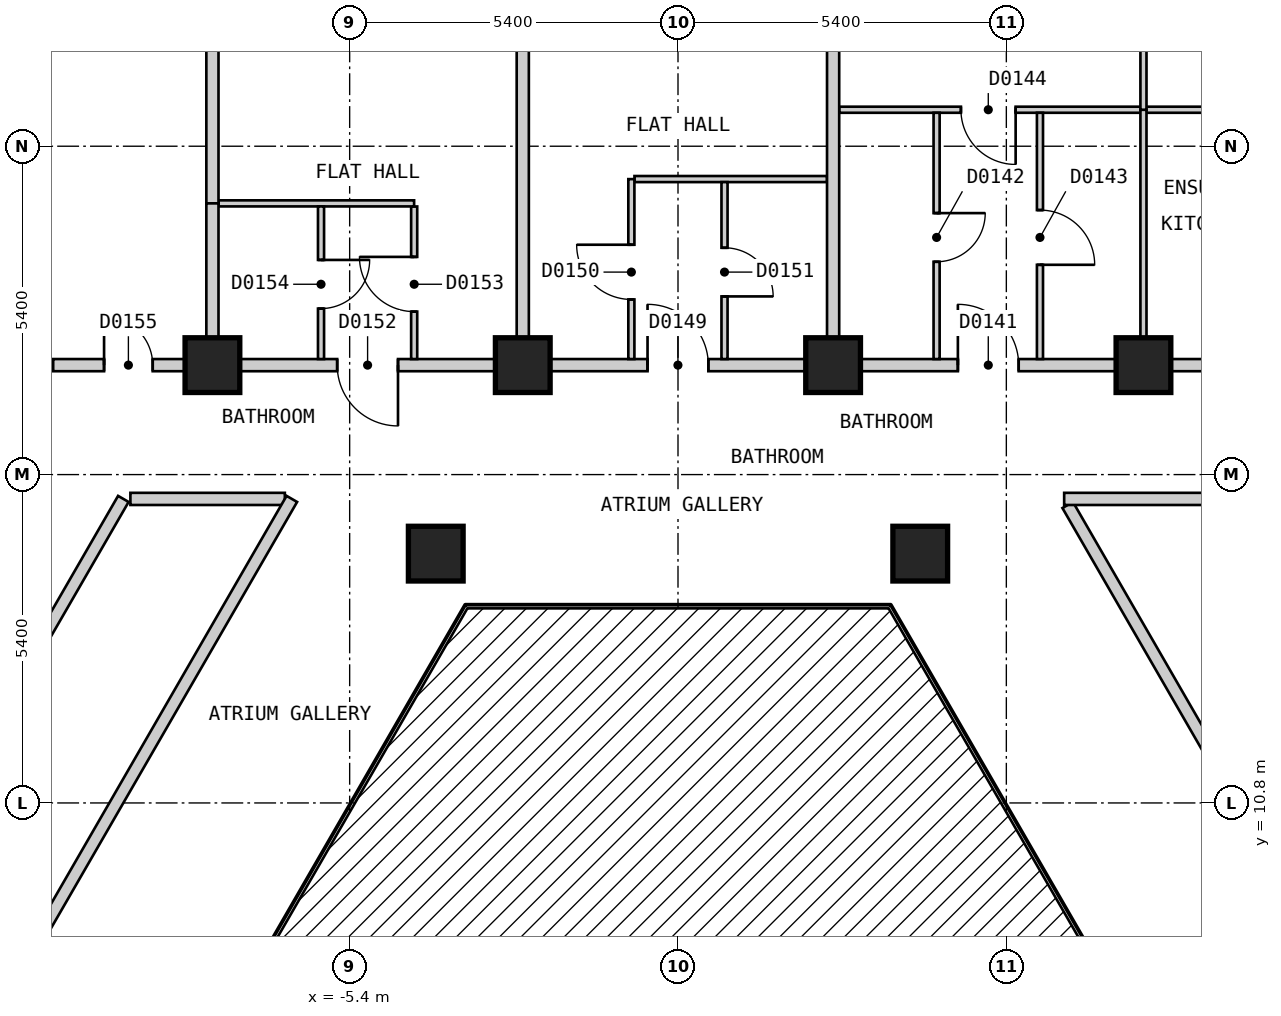
"""IFC4 building model, lengths in metres.
Left out: names, types, materials, properties, quantities, classifications, styles, units other than length and angle.
Written with IfcOpenShell. Run it as: python <this file> out.ifc"""

import sys

from ifc_helpers import new_model, si_unit, direction, frame, frame_2d, origin, origin_2d, place, context, subcontext, project, spatial, rectangle, extrude, element, fill, save


model = new_model("IFC4")
c1 = context("Model", 3, precision=1e-05, world=origin(), true_north=direction((0.0, 1.0)))
c2 = subcontext(c1, "Body", "Model", "MODEL_VIEW")
j1 = project(units=[si_unit("LENGTHUNIT", "METRE"), si_unit("PLANEANGLEUNIT", "RADIAN")], contexts=[c1])
p1 = place(None, origin())
s1 = spatial("IfcSite", under=j1, at=p1, CompositionType="ELEMENT")
p2 = place(p1, origin())
s2 = spatial("IfcBuilding", under=s1, at=p2, CompositionType="ELEMENT")
p3 = place(p2, frame((0.0, 0.0, 29.4)))
s3 = spatial("IfcBuildingStorey", under=s2, at=p3, CompositionType="ELEMENT", Elevation=29.4)
for number, where, z_axis, x_axis in (
    (1, (7.655, 18.0, 0.0), (0.0, 0.0, 1.0), (-1.0, 0.0, 0.0)),
    (2, (3.984, 14.9, 0.0), (0.0, 0.0, 1.0), (1.0, 0.0, 0.0)),
    (3, (2.551, 18.0, 0.0), (0.0, 0.0, 1.0), (-1.0, 0.0, 0.0)),
    (4, (-2.553, 18.0, 0.0), (0.0, 0.0, 1.0), (-1.0, 0.0, 0.0)),
    (5, (-3.984, 14.9, 0.0), (0.0, 0.0, 1.0), (1.0, 0.0, 0.0)),
    (6, (-7.657, 18.0, 0.0), (0.0, 0.0, 1.0), (-1.0, 0.0, 0.0)),
):
    element("IfcColumn", number, at=place(p3, frame(where, z_axis=z_axis, x_axis=x_axis)), inside=s3, PredefinedType="COLUMN", context=c2, shape_type="SweptSolid", body=[
        extrude(rectangle(XDim=0.9, YDim=0.9, at=origin_2d()), origin(), (0.0, 0.0, 1.0), 3.0),
    ])
p4 = place(p3, frame((6.409, 15.7, 0.0), z_axis=(0.0, 0.0, 1.0), x_axis=(0.499930377127, -0.866065596838, 0.0)))
e7 = element("IfcWall", 7, at=p4, inside=s3, PredefinedType="PARTITIONING", context=c2, shape_type="SweptSolid", body=[
    extrude(rectangle(XDim=8.775, YDim=0.2, at=frame_2d((4.388, 0.0))), origin(), (0.0, 0.0, 1.0), 2.7),
])
p5 = place(p3, frame((-9.006, 15.8, 0.0), z_axis=(0.0, 0.0, 1.0), x_axis=(1.0, 0.0, 0.0)))
e8 = element("IfcWall", 8, at=p5, inside=s3, PredefinedType="PARTITIONING", context=c2, shape_type="SweptSolid", body=[
    extrude(rectangle(XDim=2.54, YDim=0.2, at=frame_2d((1.27, 0.0))), origin(), (0.0, 0.0, 1.0), 2.7),
])
p6 = place(p3, frame((6.351, 15.8, 0.0), z_axis=(0.0, 0.0, 1.0), x_axis=(1.0, 0.0, 0.0)))
e9 = element("IfcWall", 9, at=p6, inside=s3, PredefinedType="PARTITIONING", context=c2, shape_type="SweptSolid", body=[
    extrude(rectangle(XDim=2.771, YDim=0.2, at=frame_2d((1.385, 0.0))), origin(), (0.0, 0.0, 1.0), 2.7),
])
p7 = place(p3, frame((-10.276, 18.0, 0.0), z_axis=(0.0, 0.0, 1.0), x_axis=(1.0, 0.0, 0.0)))
e10 = element("IfcWall", 10, at=p7, inside=s3, PredefinedType="PARTITIONING", context=c2, shape_type="SweptSolid", body=[
    extrude(rectangle(XDim=20.61, YDim=0.2, at=frame_2d((10.305, 0.0))), origin(), (0.0, 0.0, 1.0), 2.7),
])
p8 = place(p7, frame((14.879, 0.0, 0.0)))
e11 = element("IfcOpeningElement", 11, at=p8, cuts=e10, PredefinedType="OPENING", context=c2, shape_type="SweptSolid", body=[
    extrude(rectangle(XDim=1.0, YDim=2.1, at=frame_2d((0.5, 1.05))), frame((0.0, 0.11, 0.0), z_axis=(0.0, -1.0, 0.0), x_axis=(1.0, 0.0, 0.0)), (0.0, 0.0, 1.0), 0.22),
])
p9 = place(p7, frame((9.775, 0.0, 0.0)))
e12 = element("IfcOpeningElement", 12, at=p9, cuts=e10, PredefinedType="OPENING", context=c2, shape_type="SweptSolid", body=[
    extrude(rectangle(XDim=1.0, YDim=2.1, at=frame_2d((0.5, 1.05))), frame((0.0, 0.11, 0.0), z_axis=(0.0, -1.0, 0.0), x_axis=(1.0, 0.0, 0.0)), (0.0, 0.0, 1.0), 0.22),
])
p10 = place(p7, frame((4.671, 0.0, 0.0)))
e13 = element("IfcOpeningElement", 13, at=p10, cuts=e10, PredefinedType="OPENING", context=c2, shape_type="SweptSolid", body=[
    extrude(rectangle(XDim=1.0, YDim=2.1, at=frame_2d((0.5, 1.05))), frame((0.0, 0.11, 0.0), z_axis=(0.0, -1.0, 0.0), x_axis=(1.0, 0.0, 0.0)), (0.0, 0.0, 1.0), 0.22),
])
p11 = place(p7, frame((0.837, 0.0, 0.0)))
e14 = element("IfcOpeningElement", 14, at=p11, cuts=e10, PredefinedType="OPENING", context=c2, shape_type="SweptSolid", body=[
    extrude(rectangle(XDim=0.8, YDim=2.1, at=frame_2d((0.4, 1.05))), frame((0.0, 0.11, 0.0), z_axis=(0.0, -1.0, 0.0), x_axis=(1.0, 0.0, 0.0)), (0.0, 0.0, 1.0), 0.22),
])
p12 = place(p3, frame((-10.854, 8.0, 0.0), z_axis=(0.0, 0.0, 1.0), x_axis=(0.499964141897, 0.86604610548, 0.0)))
e15 = element("IfcWall", 15, at=p12, inside=s3, PredefinedType="PARTITIONING", context=c2, shape_type="SweptSolid", body=[
    extrude(rectangle(XDim=9.007, YDim=0.2, at=frame_2d((4.503, 0.0))), origin(), (0.0, 0.0, 1.0), 2.7),
])
p13 = place(p3, frame((-18.244, -0.001, 0.0), z_axis=(0.0, 0.0, 1.0), x_axis=(0.499962999376, 0.866046765051, 0.0)))
e16 = element("IfcWall", 16, at=p13, inside=s3, PredefinedType="PARTITIONING", context=c2, shape_type="SweptSolid", body=[
    extrude(rectangle(XDim=18.245, YDim=0.2, at=frame_2d((9.123, 0.0))), origin(), (0.0, 0.0, 1.0), 2.7),
])
p14 = place(p13, frame((8.672, 0.0, 0.0)))
e17 = element("IfcOpeningElement", 17, at=p14, cuts=e16, PredefinedType="OPENING", context=c2, shape_type="SweptSolid", body=[
    extrude(rectangle(XDim=0.9, YDim=2.1, at=frame_2d((0.45, 1.05))), frame((0.0, 0.11, 0.0), z_axis=(0.0, -1.0, 0.0), x_axis=(1.0, 0.0, 0.0)), (0.0, 0.0, 1.0), 0.22),
])
p15 = place(p3, frame((-4.339, 20.609, 0.0), z_axis=(0.0, 0.0, 1.0), x_axis=(0.0, -1.0, 0.0)))
e18 = element("IfcWall", 18, at=p15, inside=s3, PredefinedType="PARTITIONING", context=c2, shape_type="SweptSolid", body=[
    extrude(rectangle(XDim=2.509, YDim=0.1, at=frame_2d((1.254, 0.0))), origin(), (0.0, 0.0, 1.0), 2.7),
])
p16 = place(p15, frame((0.829, 0.0, 0.0)))
e19 = element("IfcOpeningElement", 19, at=p16, cuts=e18, PredefinedType="OPENING", context=c2, shape_type="SweptSolid", body=[
    extrude(rectangle(XDim=0.9, YDim=2.1, at=frame_2d((0.45, 1.05))), frame((0.0, 0.06, 0.0), z_axis=(0.0, -1.0, 0.0), x_axis=(1.0, 0.0, 0.0)), (0.0, 0.0, 1.0), 0.12),
])
p17 = place(p3, frame((-7.557, 20.66, 0.0), z_axis=(0.0, 0.0, 1.0), x_axis=(1.0, 0.0, 0.0)))
e20 = element("IfcWall", 20, at=p17, inside=s3, PredefinedType="PARTITIONING", context=c2, shape_type="SweptSolid", body=[
    extrude(rectangle(XDim=3.217, YDim=0.1, at=frame_2d((1.608, 0.0))), origin(), (0.0, 0.0, 1.0), 2.7),
])
p18 = place(p3, frame((-0.716, 21.06, 0.0), z_axis=(0.0, 0.0, 1.0), x_axis=(1.0, 0.0, 0.0)))
e21 = element("IfcWall", 21, at=p18, inside=s3, PredefinedType="PARTITIONING", context=c2, shape_type="SweptSolid", body=[
    extrude(rectangle(XDim=3.167, YDim=0.1, at=frame_2d((1.583, 0.0))), origin(), (0.0, 0.0, 1.0), 2.7),
])
p19 = place(p3, frame((2.651, 22.2, 0.0), z_axis=(0.0, 0.0, 1.0), x_axis=(1.0, 0.0, 0.0)))
e22 = element("IfcWall", 22, at=p19, inside=s3, PredefinedType="PARTITIONING", context=c2, shape_type="SweptSolid", body=[
    extrude(rectangle(XDim=10.109, YDim=0.1, at=frame_2d((5.055, 0.0))), origin(), (0.0, 0.0, 1.0), 2.7),
])
p20 = place(p19, frame((2.002, 0.0, 0.0)))
e23 = element("IfcOpeningElement", 23, at=p20, cuts=e22, PredefinedType="OPENING", context=c2, shape_type="SweptSolid", body=[
    extrude(rectangle(XDim=0.9, YDim=2.1, at=frame_2d((0.45, 1.05))), frame((0.0, 0.06, 0.0), z_axis=(0.0, -1.0, 0.0), x_axis=(1.0, 0.0, 0.0)), (0.0, 0.0, 1.0), 0.12),
])
p21 = place(p19, frame((7.185, 0.0, 0.0)))
e24 = element("IfcOpeningElement", 24, at=p21, cuts=e22, PredefinedType="OPENING", context=c2, shape_type="SweptSolid", body=[
    extrude(rectangle(XDim=0.8, YDim=2.1, at=frame_2d((0.4, 1.05))), frame((0.0, 0.06, 0.0), z_axis=(0.0, -1.0, 0.0), x_axis=(1.0, 0.0, 0.0)), (0.0, 0.0, 1.0), 0.12),
])
p22 = place(p3, frame((4.253, 18.1, 0.0), z_axis=(0.0, 0.0, 1.0), x_axis=(0.0, 1.0, 0.0)))
e25 = element("IfcWall", 25, at=p22, inside=s3, PredefinedType="PARTITIONING", context=c2, shape_type="SweptSolid", body=[
    extrude(rectangle(XDim=4.05, YDim=0.1, at=frame_2d((2.025, 0.0))), origin(), (0.0, 0.0, 1.0), 2.7),
])
p23 = place(p22, frame((1.6, 0.0, 0.0)))
e26 = element("IfcOpeningElement", 26, at=p23, cuts=e25, PredefinedType="OPENING", context=c2, shape_type="SweptSolid", body=[
    extrude(rectangle(XDim=0.8, YDim=2.1, at=frame_2d((0.4, 1.05))), frame((0.0, 0.06, 0.0), z_axis=(0.0, -1.0, 0.0), x_axis=(1.0, 0.0, 0.0)), (0.0, 0.0, 1.0), 0.12),
])
p24 = place(p3, frame((5.953, 18.1, 0.0), z_axis=(0.0, 0.0, 1.0), x_axis=(0.0, 1.0, 0.0)))
e27 = element("IfcWall", 27, at=p24, inside=s3, PredefinedType="PARTITIONING", context=c2, shape_type="SweptSolid", body=[
    extrude(rectangle(XDim=4.05, YDim=0.1, at=frame_2d((2.025, 0.0))), origin(), (0.0, 0.0, 1.0), 2.7),
])
p25 = place(p24, frame((1.55, 0.0, 0.0)))
e28 = element("IfcOpeningElement", 28, at=p25, cuts=e27, PredefinedType="OPENING", context=c2, shape_type="SweptSolid", body=[
    extrude(rectangle(XDim=0.9, YDim=2.1, at=frame_2d((0.45, 1.05))), frame((0.0, 0.06, 0.0), z_axis=(0.0, -1.0, 0.0), x_axis=(1.0, 0.0, 0.0)), (0.0, 0.0, 1.0), 0.12),
])
p26 = place(p3, frame((0.765, 18.1, 0.0), z_axis=(0.0, 0.0, 1.0), x_axis=(0.0, 1.0, 0.0)))
e29 = element("IfcWall", 29, at=p26, inside=s3, PredefinedType="PARTITIONING", context=c2, shape_type="SweptSolid", body=[
    extrude(rectangle(XDim=2.91, YDim=0.1, at=frame_2d((1.455, 0.0))), origin(), (0.0, 0.0, 1.0), 2.7),
])
p27 = place(p26, frame((1.03, 0.0, 0.0)))
e30 = element("IfcOpeningElement", 30, at=p27, cuts=e29, PredefinedType="OPENING", context=c2, shape_type="SweptSolid", body=[
    extrude(rectangle(XDim=0.8, YDim=2.1, at=frame_2d((0.4, 1.05))), frame((0.0, 0.06, 0.0), z_axis=(0.0, -1.0, 0.0), x_axis=(1.0, 0.0, 0.0)), (0.0, 0.0, 1.0), 0.12),
])
p28 = place(p3, frame((7.655, 18.1, 0.0), z_axis=(0.0, 0.0, 1.0), x_axis=(0.0, 1.0, 0.0)))
e31 = element("IfcWall", 31, at=p28, inside=s3, PredefinedType="PARTITIONING", context=c2, shape_type="SweptSolid", body=[
    extrude(rectangle(XDim=4.1, YDim=0.1, at=frame_2d((2.05, 0.0))), origin(), (0.0, 0.0, 1.0), 2.7),
])
p29 = place(p3, frame((-5.871, 18.1, 0.0), z_axis=(0.0, 0.0, 1.0), x_axis=(0.0, 1.0, 0.0)))
e32 = element("IfcWall", 32, at=p29, inside=s3, PredefinedType="PARTITIONING", context=c2, shape_type="SweptSolid", body=[
    extrude(rectangle(XDim=2.51, YDim=0.1, at=frame_2d((1.255, 0.0))), origin(), (0.0, 0.0, 1.0), 2.7),
])
p30 = place(p29, frame((0.83, 0.0, 0.0)))
e33 = element("IfcOpeningElement", 33, at=p30, cuts=e32, PredefinedType="OPENING", context=c2, shape_type="SweptSolid", body=[
    extrude(rectangle(XDim=0.8, YDim=2.1, at=frame_2d((0.4, 1.05))), frame((0.0, 0.06, 0.0), z_axis=(0.0, -1.0, 0.0), x_axis=(1.0, 0.0, 0.0)), (0.0, 0.0, 1.0), 0.12),
])
p31 = place(p3, frame((-0.767, 18.1, 0.0), z_axis=(0.0, 0.0, 1.0), x_axis=(0.0, 1.0, 0.0)))
e34 = element("IfcWall", 34, at=p31, inside=s3, PredefinedType="PARTITIONING", context=c2, shape_type="SweptSolid", body=[
    extrude(rectangle(XDim=2.959, YDim=0.1, at=frame_2d((1.479, 0.0))), origin(), (0.0, 0.0, 1.0), 2.7),
])
p32 = place(p31, frame((0.98, 0.0, 0.0)))
e35 = element("IfcOpeningElement", 35, at=p32, cuts=e34, PredefinedType="OPENING", context=c2, shape_type="SweptSolid", body=[
    extrude(rectangle(XDim=0.9, YDim=2.1, at=frame_2d((0.45, 1.05))), frame((0.0, 0.06, 0.0), z_axis=(0.0, -1.0, 0.0), x_axis=(1.0, 0.0, 0.0)), (0.0, 0.0, 1.0), 0.12),
])
p33 = place(p3, frame((-7.657, 28.1, 0.0), z_axis=(0.0, 0.0, 1.0), x_axis=(0.0, -1.0, 0.0)))
e36 = element("IfcWall", 36, at=p33, inside=s3, PredefinedType="PARTITIONING", context=c2, shape_type="SweptSolid", body=[
    extrude(rectangle(XDim=7.44, YDim=0.2, at=frame_2d((3.72, 0.0))), origin(), (0.0, 0.0, 1.0), 2.7),
])
for number, where, z_axis, x_axis in (
    (37, (-2.553, 28.1, 0.0), (0.0, 0.0, 1.0), (0.0, -1.0, 0.0)),
    (38, (2.551, 18.1, 0.0), (0.0, 0.0, 1.0), (0.0, 1.0, 0.0)),
):
    element("IfcWall", number, at=place(p3, frame(where, z_axis=z_axis, x_axis=x_axis)), inside=s3, PredefinedType="PARTITIONING", context=c2, shape_type="SweptSolid", body=[
        extrude(rectangle(XDim=10.0, YDim=0.2, at=frame_2d((5.0, 0.0))), origin(), (0.0, 0.0, 1.0), 2.7),
    ])
p34 = place(p3, frame((-7.657, 18.1, 0.0), z_axis=(0.0, 0.0, 1.0), x_axis=(0.0, 1.0, 0.0)))
e39 = element("IfcWall", 39, at=p34, inside=s3, PredefinedType="PARTITIONING", context=c2, shape_type="SweptSolid", body=[
    extrude(rectangle(XDim=2.56, YDim=0.2, at=frame_2d((1.28, 0.0))), origin(), (0.0, 0.0, 1.0), 2.7),
])
p35 = place(p3, frame((7.655, 22.2, 0.0), z_axis=(0.0, 0.0, 1.0), x_axis=(0.0, 1.0, 0.0)))
e40 = element("IfcWall", 40, at=p35, inside=s3, PredefinedType="PARTITIONING", context=c2, shape_type="SweptSolid", body=[
    extrude(rectangle(XDim=5.9, YDim=0.1, at=frame_2d((2.95, 0.0))), origin(), (0.0, 0.0, 1.0), 2.7),
])
p36 = place(p35, frame((2.5, 0.0, 0.0)))
e41 = element("IfcOpeningElement", 41, at=p36, cuts=e40, PredefinedType="OPENING", context=c2, shape_type="SweptSolid", body=[
    extrude(rectangle(XDim=0.9, YDim=2.1, at=frame_2d((0.45, 1.05))), frame((0.0, 0.06, 0.0), z_axis=(0.0, -1.0, 0.0), x_axis=(1.0, 0.0, 0.0)), (0.0, 0.0, 1.0), 0.12),
])
p37 = place(p8, origin())
e42 = element("IfcDoor", 42, at=p37, inside=s3, OperationType="SINGLE_SWING_LEFT", PredefinedType="DOOR", context=c2, shape_type="SweptSolid", body=[
    extrude(rectangle(XDim=1.0, YDim=2.1, at=frame_2d((0.5, 1.05))), frame((0.0, 0.025, 0.0), z_axis=(0.0, -1.0, 0.0), x_axis=(1.0, 0.0, 0.0)), (0.0, 0.0, 1.0), 0.05),
])
fill(e11, e42)
p38 = place(p23, origin())
e43 = element("IfcDoor", 43, at=p38, inside=s3, OperationType="SINGLE_SWING_RIGHT", PredefinedType="DOOR", context=c2, shape_type="SweptSolid", body=[
    extrude(rectangle(XDim=0.8, YDim=2.1, at=frame_2d((0.4, 1.05))), frame((0.0, 0.025, 0.0), z_axis=(0.0, -1.0, 0.0), x_axis=(1.0, 0.0, 0.0)), (0.0, 0.0, 1.0), 0.05),
])
fill(e26, e43)
p39 = place(p25, origin())
e44 = element("IfcDoor", 44, at=p39, inside=s3, OperationType="SINGLE_SWING_LEFT", PredefinedType="DOOR", context=c2, shape_type="SweptSolid", body=[
    extrude(rectangle(XDim=0.9, YDim=2.1, at=frame_2d((0.45, 1.05))), frame((0.0, 0.025, 0.0), z_axis=(0.0, -1.0, 0.0), x_axis=(1.0, 0.0, 0.0)), (0.0, 0.0, 1.0), 0.05),
])
fill(e28, e44)
p40 = place(p20, origin())
e45 = element("IfcDoor", 45, at=p40, inside=s3, OperationType="SINGLE_SWING_RIGHT", PredefinedType="DOOR", context=c2, shape_type="SweptSolid", body=[
    extrude(rectangle(XDim=0.9, YDim=2.1, at=frame_2d((0.45, 1.05))), frame((0.0, 0.025, 0.0), z_axis=(0.0, -1.0, 0.0), x_axis=(1.0, 0.0, 0.0)), (0.0, 0.0, 1.0), 0.05),
])
fill(e23, e45)
p41 = place(p9, origin())
e46 = element("IfcDoor", 46, at=p41, inside=s3, OperationType="SINGLE_SWING_LEFT", PredefinedType="DOOR", context=c2, shape_type="SweptSolid", body=[
    extrude(rectangle(XDim=1.0, YDim=2.1, at=frame_2d((0.5, 1.05))), frame((0.0, 0.025, 0.0), z_axis=(0.0, -1.0, 0.0), x_axis=(1.0, 0.0, 0.0)), (0.0, 0.0, 1.0), 0.05),
])
fill(e12, e46)
p42 = place(p32, origin())
e47 = element("IfcDoor", 47, at=p42, inside=s3, OperationType="SINGLE_SWING_RIGHT", PredefinedType="DOOR", context=c2, shape_type="SweptSolid", body=[
    extrude(rectangle(XDim=0.9, YDim=2.1, at=frame_2d((0.45, 1.05))), frame((0.0, 0.025, 0.0), z_axis=(0.0, -1.0, 0.0), x_axis=(1.0, 0.0, 0.0)), (0.0, 0.0, 1.0), 0.05),
])
fill(e35, e47)
p43 = place(p27, origin())
e48 = element("IfcDoor", 48, at=p43, inside=s3, OperationType="SINGLE_SWING_LEFT", PredefinedType="DOOR", context=c2, shape_type="SweptSolid", body=[
    extrude(rectangle(XDim=0.8, YDim=2.1, at=frame_2d((0.4, 1.05))), frame((0.0, 0.025, 0.0), z_axis=(0.0, -1.0, 0.0), x_axis=(1.0, 0.0, 0.0)), (0.0, 0.0, 1.0), 0.05),
])
fill(e30, e48)
p44 = place(p10, origin())
e49 = element("IfcDoor", 49, at=p44, inside=s3, OperationType="SINGLE_SWING_RIGHT", PredefinedType="DOOR", context=c2, shape_type="SweptSolid", body=[
    extrude(rectangle(XDim=1.0, YDim=2.1, at=frame_2d((0.5, 1.05))), frame((0.0, 0.025, 0.0), z_axis=(0.0, -1.0, 0.0), x_axis=(1.0, 0.0, 0.0)), (0.0, 0.0, 1.0), 0.05),
])
fill(e13, e49)
p45 = place(p16, origin())
e50 = element("IfcDoor", 50, at=p45, inside=s3, OperationType="SINGLE_SWING_LEFT", PredefinedType="DOOR", context=c2, shape_type="SweptSolid", body=[
    extrude(rectangle(XDim=0.9, YDim=2.1, at=frame_2d((0.45, 1.05))), frame((0.0, 0.025, 0.0), z_axis=(0.0, -1.0, 0.0), x_axis=(1.0, 0.0, 0.0)), (0.0, 0.0, 1.0), 0.05),
])
fill(e19, e50)
p46 = place(p30, origin())
e51 = element("IfcDoor", 51, at=p46, inside=s3, OperationType="SINGLE_SWING_RIGHT", PredefinedType="DOOR", context=c2, shape_type="SweptSolid", body=[
    extrude(rectangle(XDim=0.8, YDim=2.1, at=frame_2d((0.4, 1.05))), frame((0.0, 0.025, 0.0), z_axis=(0.0, -1.0, 0.0), x_axis=(1.0, 0.0, 0.0)), (0.0, 0.0, 1.0), 0.05),
])
fill(e33, e51)
p47 = place(p11, origin())
e52 = element("IfcDoor", 52, at=p47, inside=s3, OperationType="SINGLE_SWING_LEFT", PredefinedType="DOOR", context=c2, shape_type="SweptSolid", body=[
    extrude(rectangle(XDim=0.8, YDim=2.1, at=frame_2d((0.4, 1.05))), frame((0.0, 0.025, 0.0), z_axis=(0.0, -1.0, 0.0), x_axis=(1.0, 0.0, 0.0)), (0.0, 0.0, 1.0), 0.05),
])
fill(e14, e52)
save(model, sys.argv[1])
